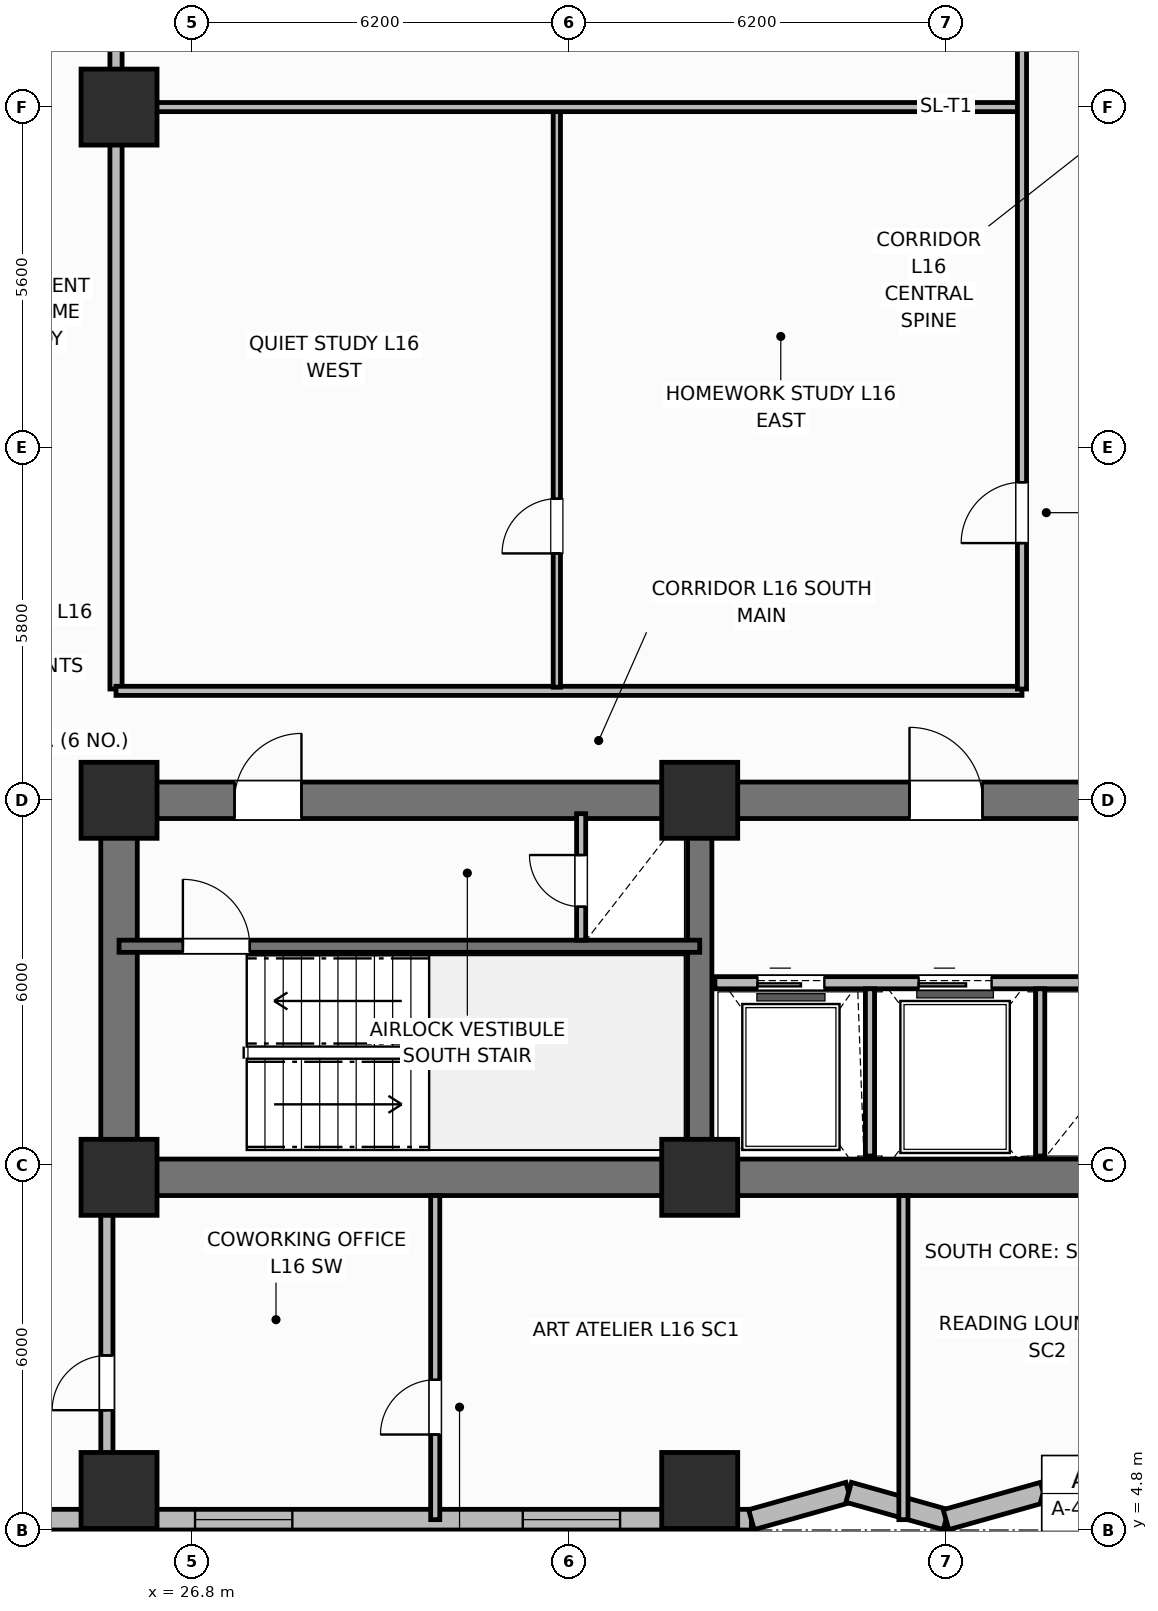
"""IFC4 building model, lengths in metres.
Left out: names, types, materials, properties, quantities, classifications, styles, units other than length and angle.
Written with IfcOpenShell. Run it as: python <this file> out.ifc"""

import sys

from ifc_helpers import new_model, si_unit, direction, frame, frame_2d, origin, origin_2d, place, context, subcontext, project, spatial, rectangle, extrude, element, fill, save


model = new_model("IFC4")
c1 = context("Model", 3, precision=1e-05, world=origin(), true_north=direction((0.0, 1.0)))
c2 = subcontext(c1, "Body", "Model", "MODEL_VIEW")
j1 = project(units=[si_unit("LENGTHUNIT", "METRE"), si_unit("PLANEANGLEUNIT", "RADIAN")], contexts=[c1])
p1 = place(None, origin())
s1 = spatial("IfcSite", under=j1, at=p1, CompositionType="ELEMENT")
p2 = place(p1, origin())
s2 = spatial("IfcBuilding", under=s1, at=p2, CompositionType="ELEMENT")
p3 = place(p2, frame((0.0, 0.0, 65.8)))
s3 = spatial("IfcBuildingStorey", under=s2, at=p3, CompositionType="ELEMENT", Elevation=65.8)
p4 = place(p3, frame((52.8, 10.6, 0.0), z_axis=(0.0, 0.0, 1.0), x_axis=(-1.0, 0.0, 0.0)))
e1 = element("IfcWall", 1, at=p4, inside=s3, PredefinedType="SHEAR", context=c2, shape_type="SweptSolid", body=[
    extrude(rectangle(XDim=27.2, YDim=0.6, at=frame_2d((13.6, 0.0))), origin(), (0.0, 0.0, 1.0), 3.7),
])
p5 = place(p3, frame((25.6, 10.9, 0.0), z_axis=(0.0, 0.0, 1.0), x_axis=(0.0, 1.0, 0.0)))
e2 = element("IfcWall", 2, at=p5, inside=s3, PredefinedType="SHEAR", context=c2, shape_type="SweptSolid", body=[
    extrude(rectangle(XDim=5.6, YDim=0.6, at=frame_2d((2.8, 0.0))), origin(), (0.0, 0.0, 1.0), 3.7),
])
p6 = place(p3, frame((25.6, 16.8, 0.0), z_axis=(0.0, 0.0, 1.0), x_axis=(1.0, 0.0, 0.0)))
e3 = element("IfcWall", 3, at=p6, inside=s3, PredefinedType="SHEAR", context=c2, shape_type="SweptSolid", body=[
    extrude(rectangle(XDim=27.2, YDim=0.6, at=frame_2d((13.6, 0.0))), origin(), (0.0, 0.0, 1.0), 3.7),
])
p7 = place(p6, frame((1.9, 0.0, 0.0)))
e4 = element("IfcOpeningElement", 4, at=p7, cuts=e3, PredefinedType="OPENING", context=c2, shape_type="SweptSolid", body=[
    extrude(rectangle(XDim=1.1, YDim=2.15, at=frame_2d((0.55, 1.075))), frame((0.0, 0.31, 0.0), z_axis=(0.0, -1.0, 0.0), x_axis=(1.0, 0.0, 0.0)), (0.0, 0.0, 1.0), 0.62),
])
p8 = place(p6, frame((13.0, 0.0, 0.0)))
e5 = element("IfcOpeningElement", 5, at=p8, cuts=e3, PredefinedType="OPENING", context=c2, shape_type="SweptSolid", body=[
    extrude(rectangle(XDim=1.2, YDim=2.15, at=frame_2d((0.6, 1.075))), frame((0.0, 0.31, 0.0), z_axis=(0.0, -1.0, 0.0), x_axis=(1.0, 0.0, 0.0)), (0.0, 0.0, 1.0), 0.62),
])
p9 = place(p6, frame((20.4, 0.0, 0.0)))
e6 = element("IfcOpeningElement", 6, at=p9, cuts=e3, PredefinedType="OPENING", context=c2, shape_type="SweptSolid", body=[
    extrude(rectangle(XDim=1.3, YDim=2.2, at=frame_2d((0.65, 1.1))), frame((0.0, 0.31, 0.0), z_axis=(0.0, -1.0, 0.0), x_axis=(1.0, 0.0, 0.0)), (0.0, 0.0, 1.0), 0.62),
])
p10 = place(p6, frame((24.65, 0.0, 0.0)))
e7 = element("IfcOpeningElement", 7, at=p10, cuts=e3, PredefinedType="OPENING", context=c2, shape_type="SweptSolid", body=[
    extrude(rectangle(XDim=0.85, YDim=2.1, at=frame_2d((0.425, 1.05))), frame((0.0, 0.31, 0.0), z_axis=(0.0, -1.0, 0.0), x_axis=(1.0, 0.0, 0.0)), (0.0, 0.0, 1.0), 0.62),
])
p11 = place(p3, frame((35.15, 10.9, 0.0), z_axis=(0.0, 0.0, 1.0), x_axis=(0.0, 1.0, 0.0)))
e8 = element("IfcWall", 8, at=p11, inside=s3, PredefinedType="SHEAR", context=c2, shape_type="SweptSolid", body=[
    extrude(rectangle(XDim=5.6, YDim=0.4, at=frame_2d((2.8, 0.0))), origin(), (0.0, 0.0, 1.0), 3.7),
])
for number, where, z_axis, x_axis in (
    (9, (25.6, 10.6, 0.0), (0.0, 0.0, 1.0), (1.0, 0.0, 0.0)),
    (10, (25.6, 16.8, 0.0), (0.0, 0.0, 1.0), (1.0, 0.0, 0.0)),
    (11, (35.15, 10.6, 0.0), (0.0, 0.0, 1.0), (1.0, 0.0, 0.0)),
    (12, (35.15, 16.8, 0.0), (0.0, 0.0, 1.0), (1.0, 0.0, 0.0)),
    (13, (25.6, 28.2, 0.0), (0.0, 0.0, 1.0), (1.0, 0.0, 0.0)),
    (14, (25.6, 5.45, 0.0), (0.0, 0.0, 1.0), (1.0, 0.0, 0.0)),
    (15, (35.15, 5.45, 0.0), (0.0, 0.0, 1.0), (1.0, 0.0, 0.0)),
):
    element("IfcColumn", number, at=place(p3, frame(where, z_axis=z_axis, x_axis=x_axis)), inside=s3, PredefinedType="COLUMN", context=c2, shape_type="SweptSolid", body=[
        extrude(rectangle(XDim=1.25, YDim=1.25, at=origin_2d()), origin(), (0.0, 0.0, 1.0), 3.7),
    ])
p12 = place(p3, frame((18.6, 4.97, 0.0), z_axis=(0.0, 0.0, 1.0), x_axis=(1.0, 0.0, 0.0)))
e16 = element("IfcWall", 16, at=p12, inside=s3, PredefinedType="SOLIDWALL", context=c2, shape_type="SweptSolid", body=[
    extrude(rectangle(XDim=17.4, YDim=0.34, at=frame_2d((8.7, 0.0))), origin(), (0.0, 0.0, 1.0), 2.7),
])
p13 = place(p12, frame((1.46, 0.0, 0.68)))
e17 = element("IfcOpeningElement", 17, at=p13, cuts=e16, PredefinedType="OPENING", context=c2, shape_type="SweptSolid", body=[
    extrude(rectangle(XDim=1.6, YDim=1.9, at=frame_2d((0.8, 0.95))), frame((0.0, 0.18, 0.0), z_axis=(0.0, -1.0, 0.0), x_axis=(1.0, 0.0, 0.0)), (0.0, 0.0, 1.0), 0.36),
])
p14 = place(p12, frame((8.25, 0.0, 0.68)))
e18 = element("IfcOpeningElement", 18, at=p14, cuts=e16, PredefinedType="OPENING", context=c2, shape_type="SweptSolid", body=[
    extrude(rectangle(XDim=1.6, YDim=1.9, at=frame_2d((0.8, 0.95))), frame((0.0, 0.18, 0.0), z_axis=(0.0, -1.0, 0.0), x_axis=(1.0, 0.0, 0.0)), (0.0, 0.0, 1.0), 0.36),
])
p15 = place(p12, frame((13.64, 0.0, 0.68)))
e19 = element("IfcOpeningElement", 19, at=p15, cuts=e16, PredefinedType="OPENING", context=c2, shape_type="SweptSolid", body=[
    extrude(rectangle(XDim=1.6, YDim=1.9, at=frame_2d((0.8, 0.95))), frame((0.0, 0.18, 0.0), z_axis=(0.0, -1.0, 0.0), x_axis=(1.0, 0.0, 0.0)), (0.0, 0.0, 1.0), 0.36),
])
p16 = place(p3, frame((36.0, 4.97, 0.0), z_axis=(0.0, 0.0, 1.0), x_axis=(0.962662902433, 0.270703040766, 0.0)))
e20 = element("IfcWall", 20, at=p16, inside=s3, PredefinedType="SOLIDWALL", context=c2, shape_type="SweptSolid", body=[
    extrude(rectangle(XDim=1.662, YDim=0.34, at=frame_2d((0.831, 0.0))), origin(), (0.0, 0.0, 1.0), 2.7),
])
p17 = place(p3, frame((37.6, 5.42, 0.0), z_axis=(0.0, 0.0, 1.0), x_axis=(0.962652136636, -0.270741322725, 0.0)))
e21 = element("IfcWall", 21, at=p17, inside=s3, PredefinedType="SOLIDWALL", context=c2, shape_type="SweptSolid", body=[
    extrude(rectangle(XDim=1.662, YDim=0.34, at=frame_2d((0.831, 0.0))), origin(), (0.0, 0.0, 1.0), 2.7),
])
p18 = place(p3, frame((39.2, 4.97, 0.0), z_axis=(0.0, 0.0, 1.0), x_axis=(0.962662902433, 0.270703040766, 0.0)))
e22 = element("IfcWall", 22, at=p18, inside=s3, PredefinedType="SOLIDWALL", context=c2, shape_type="SweptSolid", body=[
    extrude(rectangle(XDim=1.662, YDim=0.34, at=frame_2d((0.831, 0.0))), origin(), (0.0, 0.0, 1.0), 2.7),
])
p19 = place(p3, frame((40.8, 5.42, 0.0), z_axis=(0.0, 0.0, 1.0), x_axis=(0.962652136636, -0.270741322725, 0.0)))
e23 = element("IfcWall", 23, at=p19, inside=s3, PredefinedType="SOLIDWALL", context=c2, shape_type="SweptSolid", body=[
    extrude(rectangle(XDim=1.662, YDim=0.34, at=frame_2d((0.831, 0.0))), origin(), (0.0, 0.0, 1.0), 2.7),
])
p20 = place(p3, frame((25.6, 14.4, 0.0), z_axis=(0.0, 0.0, 1.0), x_axis=(1.0, 0.0, 0.0)))
e24 = element("IfcWall", 24, at=p20, inside=s3, PredefinedType="SHEAR", context=c2, shape_type="SweptSolid", body=[
    extrude(rectangle(XDim=9.55, YDim=0.2, at=frame_2d((4.775, 0.0))), origin(), (0.0, 0.0, 1.0), 3.7),
])
p21 = place(p20, frame((1.05, 0.0, 0.0)))
e25 = element("IfcOpeningElement", 25, at=p21, cuts=e24, PredefinedType="OPENING", context=c2, shape_type="SweptSolid", body=[
    extrude(rectangle(XDim=1.1, YDim=2.15, at=frame_2d((0.55, 1.075))), frame((0.0, 0.11, 0.0), z_axis=(0.0, -1.0, 0.0), x_axis=(1.0, 0.0, 0.0)), (0.0, 0.0, 1.0), 0.22),
])
p22 = place(p3, frame((33.2, 14.5, 0.0), z_axis=(0.0, 0.0, 1.0), x_axis=(0.0, 1.0, 0.0)))
e26 = element("IfcWall", 26, at=p22, inside=s3, PredefinedType="PARTITIONING", context=c2, shape_type="SweptSolid", body=[
    extrude(rectangle(XDim=2.08, YDim=0.15, at=frame_2d((1.04, 0.0))), origin(), (0.0, 0.0, 1.0), 2.53),
])
p23 = place(p22, frame((0.55, 0.0, 0.0)))
e27 = element("IfcOpeningElement", 27, at=p23, cuts=e26, PredefinedType="OPENING", context=c2, shape_type="SweptSolid", body=[
    extrude(rectangle(XDim=0.85, YDim=2.05, at=frame_2d((0.425, 1.025))), frame((0.0, 0.085, 0.0), z_axis=(0.0, -1.0, 0.0), x_axis=(1.0, 0.0, 0.0)), (0.0, 0.0, 1.0), 0.17),
])
p24 = place(p3, frame((35.4, 13.8, 0.0), z_axis=(0.0, 0.0, 1.0), x_axis=(1.0, 0.0, 0.0)))
e28 = element("IfcWall", 28, at=p24, inside=s3, PredefinedType="PARTITIONING", context=c2, shape_type="SweptSolid", body=[
    extrude(rectangle(XDim=7.6, YDim=0.2, at=frame_2d((3.8, 0.0))), origin(), (0.0, 0.0, 1.0), 2.3),
])
p25 = place(p24, frame((0.7, 0.0, 0.0)))
e29 = element("IfcOpeningElement", 29, at=p25, cuts=e28, PredefinedType="OPENING", context=c2, shape_type="SweptSolid", body=[
    extrude(rectangle(XDim=1.1, YDim=2.15, at=frame_2d((0.55, 1.075))), frame((0.0, 0.11, 0.0), z_axis=(0.0, -1.0, 0.0), x_axis=(1.0, 0.0, 0.0)), (0.0, 0.0, 1.0), 0.22),
])
p26 = place(p24, frame((3.35, 0.0, 0.0)))
e30 = element("IfcOpeningElement", 30, at=p26, cuts=e28, PredefinedType="OPENING", context=c2, shape_type="SweptSolid", body=[
    extrude(rectangle(XDim=1.2, YDim=2.15, at=frame_2d((0.6, 1.075))), frame((0.0, 0.11, 0.0), z_axis=(0.0, -1.0, 0.0), x_axis=(1.0, 0.0, 0.0)), (0.0, 0.0, 1.0), 0.22),
])
for number, where, z_axis, x_axis in (
    (31, (37.95, 10.95, 0.0), (0.0, 0.0, 1.0), (0.0, 1.0, 0.0)),
    (32, (40.75, 10.95, 0.0), (0.0, 0.0, 1.0), (0.0, 1.0, 0.0)),
):
    element("IfcWall", number, at=place(p3, frame(where, z_axis=z_axis, x_axis=x_axis)), inside=s3, PredefinedType="PARTITIONING", context=c2, shape_type="SweptSolid", body=[
        extrude(rectangle(XDim=2.75, YDim=0.15, at=frame_2d((1.375, 0.0))), origin(), (0.0, 0.0, 1.0), 2.53),
    ])
p27 = place(p3, frame((25.55, 18.63, 0.0), z_axis=(0.0, 0.0, 1.0), x_axis=(0.0, 1.0, 0.0)))
e33 = element("IfcWall", 33, at=p27, inside=s3, PredefinedType="PARTITIONING", context=c2, shape_type="SweptSolid", body=[
    extrude(rectangle(XDim=19.14, YDim=0.2, at=frame_2d((9.57, 0.0))), origin(), (0.0, 0.0, 1.0), 2.53),
])
p28 = place(p3, frame((25.55, 18.6, 0.0), z_axis=(0.0, 0.0, 1.0), x_axis=(1.0, 0.0, 0.0)))
e34 = element("IfcWall", 34, at=p28, inside=s3, PredefinedType="PARTITIONING", context=c2, shape_type="SweptSolid", body=[
    extrude(rectangle(XDim=14.9, YDim=0.15, at=frame_2d((7.45, 0.0))), origin(), (0.0, 0.0, 1.0), 2.53),
])
p29 = place(p3, frame((32.8, 18.66, 0.0), z_axis=(0.0, 0.0, 1.0), x_axis=(0.0, 1.0, 0.0)))
e35 = element("IfcWall", 35, at=p29, inside=s3, PredefinedType="PARTITIONING", context=c2, shape_type="SweptSolid", body=[
    extrude(rectangle(XDim=9.49, YDim=0.12, at=frame_2d((4.745, 0.0))), origin(), (0.0, 0.0, 1.0), 2.53),
])
p30 = place(p29, frame((2.2, 0.0, 0.0)))
e36 = element("IfcOpeningElement", 36, at=p30, cuts=e35, PredefinedType="OPENING", context=c2, shape_type="SweptSolid", body=[
    extrude(rectangle(XDim=0.9, YDim=2.1, at=frame_2d((0.45, 1.05))), frame((0.0, 0.07, 0.0), z_axis=(0.0, -1.0, 0.0), x_axis=(1.0, 0.0, 0.0)), (0.0, 0.0, 1.0), 0.14),
])
p31 = place(p3, frame((25.6, 28.2, 0.0), z_axis=(0.0, 0.0, 1.0), x_axis=(1.0, 0.0, 0.0)))
e37 = element("IfcWall", 37, at=p31, inside=s3, PredefinedType="PARTITIONING", context=c2, shape_type="SweptSolid", body=[
    extrude(rectangle(XDim=14.87, YDim=0.15, at=frame_2d((7.435, 0.0))), origin(), (0.0, 0.0, 1.0), 2.53),
])
p32 = place(p3, frame((40.45, 18.63, 0.0), z_axis=(0.0, 0.0, 1.0), x_axis=(0.0, 1.0, 0.0)))
e38 = element("IfcWall", 38, at=p32, inside=s3, PredefinedType="PARTITIONING", context=c2, shape_type="SweptSolid", body=[
    extrude(rectangle(XDim=19.14, YDim=0.15, at=frame_2d((9.57, 0.0))), origin(), (0.0, 0.0, 1.0), 2.53),
])
p33 = place(p32, frame((2.4, 0.0, 0.0)))
e39 = element("IfcOpeningElement", 39, at=p33, cuts=e38, PredefinedType="OPENING", context=c2, shape_type="SweptSolid", body=[
    extrude(rectangle(XDim=1.0, YDim=2.15, at=frame_2d((0.5, 1.075))), frame((0.0, 0.085, 0.0), z_axis=(0.0, -1.0, 0.0), x_axis=(1.0, 0.0, 0.0)), (0.0, 0.0, 1.0), 0.17),
])
p34 = place(p32, frame((11.4, 0.0, 0.0)))
e40 = element("IfcOpeningElement", 40, at=p34, cuts=e38, PredefinedType="OPENING", context=c2, shape_type="SweptSolid", body=[
    extrude(rectangle(XDim=1.0, YDim=2.15, at=frame_2d((0.5, 1.075))), frame((0.0, 0.085, 0.0), z_axis=(0.0, -1.0, 0.0), x_axis=(1.0, 0.0, 0.0)), (0.0, 0.0, 1.0), 0.17),
])
p35 = place(p3, frame((30.8, 4.97, 0.0), z_axis=(0.0, 0.0, 1.0), x_axis=(0.0, 1.0, 0.0)))
e41 = element("IfcWall", 41, at=p35, inside=s3, PredefinedType="PARTITIONING", context=c2, shape_type="SweptSolid", body=[
    extrude(rectangle(XDim=5.33, YDim=0.15, at=frame_2d((2.665, 0.0))), origin(), (0.0, 0.0, 1.0), 2.53),
])
p36 = place(p35, frame((1.4, 0.0, 0.0)))
e42 = element("IfcOpeningElement", 42, at=p36, cuts=e41, PredefinedType="OPENING", context=c2, shape_type="SweptSolid", body=[
    extrude(rectangle(XDim=0.9, YDim=2.1, at=frame_2d((0.45, 1.05))), frame((0.0, 0.085, 0.0), z_axis=(0.0, -1.0, 0.0), x_axis=(1.0, 0.0, 0.0)), (0.0, 0.0, 1.0), 0.17),
])
p37 = place(p3, frame((38.5, 4.97, 0.0), z_axis=(0.0, 0.0, 1.0), x_axis=(0.0, 1.0, 0.0)))
e43 = element("IfcWall", 43, at=p37, inside=s3, PredefinedType="PARTITIONING", context=c2, shape_type="SweptSolid", body=[
    extrude(rectangle(XDim=5.33, YDim=0.15, at=frame_2d((2.665, 0.0))), origin(), (0.0, 0.0, 1.0), 2.53),
])
p38 = place(p3, frame((25.4, 5.72, 0.0), z_axis=(0.0, 0.0, 1.0), x_axis=(0.0, 1.0, 0.0)))
e44 = element("IfcWall", 44, at=p38, inside=s3, PredefinedType="PARTITIONING", context=c2, shape_type="SweptSolid", body=[
    extrude(rectangle(XDim=4.58, YDim=0.2, at=frame_2d((2.29, 0.0))), origin(), (0.0, 0.0, 1.0), 2.53),
])
p39 = place(p38, frame((1.05, 0.0, 0.0)))
e45 = element("IfcOpeningElement", 45, at=p39, cuts=e44, PredefinedType="OPENING", context=c2, shape_type="SweptSolid", body=[
    extrude(rectangle(XDim=0.9, YDim=2.1, at=frame_2d((0.45, 1.05))), frame((0.0, 0.11, 0.0), z_axis=(0.0, -1.0, 0.0), x_axis=(1.0, 0.0, 0.0)), (0.0, 0.0, 1.0), 0.22),
])
p40 = place(p14, origin())
e46 = element("IfcWindow", 46, at=p40, inside=s3, PartitioningType="SINGLE_PANEL", PredefinedType="WINDOW", context=c2, shape_type="SweptSolid", body=[
    extrude(rectangle(XDim=1.6, YDim=1.9, at=frame_2d((0.8, 0.95))), frame((0.0, 0.03, 0.0), z_axis=(0.0, -1.0, 0.0), x_axis=(1.0, 0.0, 0.0)), (0.0, 0.0, 1.0), 0.06),
])
fill(e18, e46)
p41 = place(p15, origin())
e47 = element("IfcWindow", 47, at=p41, inside=s3, PartitioningType="SINGLE_PANEL", PredefinedType="WINDOW", context=c2, shape_type="SweptSolid", body=[
    extrude(rectangle(XDim=1.6, YDim=1.9, at=frame_2d((0.8, 0.95))), frame((0.0, 0.03, 0.0), z_axis=(0.0, -1.0, 0.0), x_axis=(1.0, 0.0, 0.0)), (0.0, 0.0, 1.0), 0.06),
])
fill(e19, e47)
p42 = place(p21, origin())
e48 = element("IfcDoor", 48, at=p42, inside=s3, OperationType="SINGLE_SWING_LEFT", PredefinedType="DOOR", context=c2, shape_type="SweptSolid", body=[
    extrude(rectangle(XDim=1.1, YDim=2.15, at=frame_2d((0.55, 1.075))), frame((0.0, 0.025, 0.0), z_axis=(0.0, -1.0, 0.0), x_axis=(1.0, 0.0, 0.0)), (0.0, 0.0, 1.0), 0.05),
])
fill(e25, e48)
p43 = place(p23, origin())
e49 = element("IfcDoor", 49, at=p43, inside=s3, OperationType="SINGLE_SWING_RIGHT", PredefinedType="TRAPDOOR", context=c2, shape_type="SweptSolid", body=[
    extrude(rectangle(XDim=0.85, YDim=2.05, at=frame_2d((0.425, 1.025))), frame((0.0, 0.025, 0.0), z_axis=(0.0, -1.0, 0.0), x_axis=(1.0, 0.0, 0.0)), (0.0, 0.0, 1.0), 0.05),
])
fill(e27, e49)
p44 = place(p25, origin())
e50 = element("IfcDoor", 50, at=p44, inside=s3, OperationType="SLIDING_TO_LEFT", PredefinedType="DOOR", context=c2, shape_type="SweptSolid", body=[
    extrude(rectangle(XDim=1.1, YDim=2.15, at=frame_2d((0.55, 1.075))), frame((0.0, 0.025, 0.0), z_axis=(0.0, -1.0, 0.0), x_axis=(1.0, 0.0, 0.0)), (0.0, 0.0, 1.0), 0.05),
])
fill(e29, e50)
p45 = place(p26, origin())
e51 = element("IfcDoor", 51, at=p45, inside=s3, OperationType="SLIDING_TO_LEFT", PredefinedType="DOOR", context=c2, shape_type="SweptSolid", body=[
    extrude(rectangle(XDim=1.2, YDim=2.15, at=frame_2d((0.6, 1.075))), frame((0.0, 0.025, 0.0), z_axis=(0.0, -1.0, 0.0), x_axis=(1.0, 0.0, 0.0)), (0.0, 0.0, 1.0), 0.05),
])
fill(e30, e51)
p46 = place(p30, origin())
e52 = element("IfcDoor", 52, at=p46, inside=s3, OperationType="SINGLE_SWING_LEFT", PredefinedType="DOOR", context=c2, shape_type="SweptSolid", body=[
    extrude(rectangle(XDim=0.9, YDim=2.1, at=frame_2d((0.45, 1.05))), frame((0.0, 0.025, 0.0), z_axis=(0.0, -1.0, 0.0), x_axis=(1.0, 0.0, 0.0)), (0.0, 0.0, 1.0), 0.05),
])
fill(e36, e52)
p47 = place(p33, origin())
e53 = element("IfcDoor", 53, at=p47, inside=s3, OperationType="SINGLE_SWING_LEFT", PredefinedType="DOOR", context=c2, shape_type="SweptSolid", body=[
    extrude(rectangle(XDim=1.0, YDim=2.15, at=frame_2d((0.5, 1.075))), frame((0.0, 0.025, 0.0), z_axis=(0.0, -1.0, 0.0), x_axis=(1.0, 0.0, 0.0)), (0.0, 0.0, 1.0), 0.05),
])
fill(e39, e53)
p48 = place(p36, origin())
e54 = element("IfcDoor", 54, at=p48, inside=s3, OperationType="SINGLE_SWING_LEFT", PredefinedType="DOOR", context=c2, shape_type="SweptSolid", body=[
    extrude(rectangle(XDim=0.9, YDim=2.1, at=frame_2d((0.45, 1.05))), frame((0.0, 0.025, 0.0), z_axis=(0.0, -1.0, 0.0), x_axis=(1.0, 0.0, 0.0)), (0.0, 0.0, 1.0), 0.05),
])
fill(e42, e54)
p49 = place(p39, origin())
e55 = element("IfcDoor", 55, at=p49, inside=s3, OperationType="SINGLE_SWING_LEFT", PredefinedType="DOOR", context=c2, shape_type="SweptSolid", body=[
    extrude(rectangle(XDim=0.9, YDim=2.1, at=frame_2d((0.45, 1.05))), frame((0.0, 0.025, 0.0), z_axis=(0.0, -1.0, 0.0), x_axis=(1.0, 0.0, 0.0)), (0.0, 0.0, 1.0), 0.05),
])
fill(e45, e55)
p50 = place(p7, origin())
e56 = element("IfcDoor", 56, at=p50, inside=s3, OperationType="SINGLE_SWING_RIGHT", PredefinedType="DOOR", context=c2, shape_type="SweptSolid", body=[
    extrude(rectangle(XDim=1.1, YDim=2.15, at=frame_2d((0.55, 1.075))), frame((0.0, 0.025, 0.0), z_axis=(0.0, -1.0, 0.0), x_axis=(1.0, 0.0, 0.0)), (0.0, 0.0, 1.0), 0.05),
])
fill(e4, e56)
p51 = place(p8, origin())
e57 = element("IfcDoor", 57, at=p51, inside=s3, OperationType="SINGLE_SWING_LEFT", PredefinedType="DOOR", context=c2, shape_type="SweptSolid", body=[
    extrude(rectangle(XDim=1.2, YDim=2.15, at=frame_2d((0.6, 1.075))), frame((0.0, 0.025, 0.0), z_axis=(0.0, -1.0, 0.0), x_axis=(1.0, 0.0, 0.0)), (0.0, 0.0, 1.0), 0.05),
])
fill(e5, e57)
save(model, sys.argv[1])
